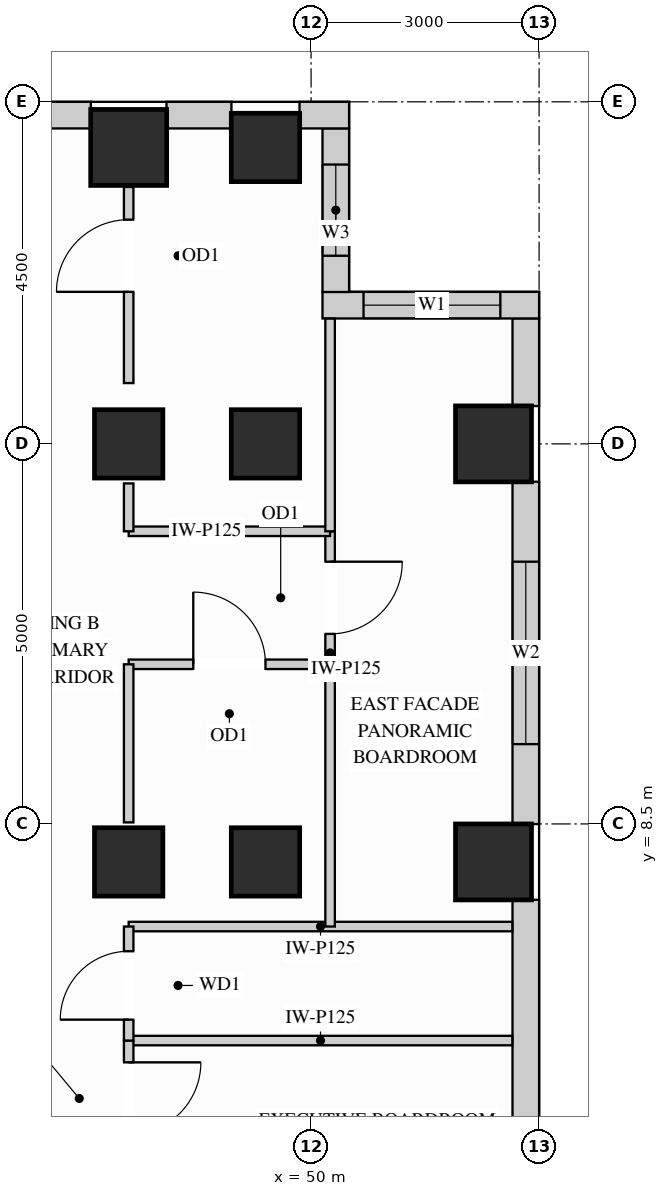
"""IFC4 building model, lengths in metres.
Left out: names, types, materials, properties, quantities, classifications, styles, units other than length and angle.
Written with IfcOpenShell. Run it as: python <this file> out.ifc"""

import sys

from ifc_helpers import new_model, si_unit, direction, frame, frame_2d, origin, origin_2d, place, context, subcontext, project, spatial, rectangle, extrude, source, transform, mapped, element, fill, save


model = new_model("IFC4")
c1 = context("Model", 3, precision=1e-05, world=origin(), true_north=direction((0.0, 1.0)))
c2 = subcontext(c1, "Body", "Model", "MODEL_VIEW")
j1 = project(units=[si_unit("LENGTHUNIT", "METRE"), si_unit("PLANEANGLEUNIT", "RADIAN")], contexts=[c1])
p1 = place(None, origin())
s1 = spatial("IfcSite", under=j1, at=p1, CompositionType="ELEMENT")
p2 = place(p1, origin())
s2 = spatial("IfcBuilding", under=s1, at=p2, CompositionType="ELEMENT")
p3 = place(p2, frame((0.0, 0.0, 204.3)))
s3 = spatial("IfcBuildingStorey", under=s2, at=p3, CompositionType="ELEMENT", Elevation=204.3)
m1 = source(origin(), c2, "Body", "SweptSolid", [
    extrude(rectangle(XDim=0.9, YDim=0.9, at=origin_2d()), origin(), (0.0, 0.0, 1.0), 3.32),
])
for number, where, z_axis, x_axis in (
    (1, (47.6, 13.5, 0.0), (0.0, 0.0, 1.0), (1.0, 0.0, 0.0)),
    (2, (47.6, 8.0, 0.0), (0.0, 0.0, 1.0), (1.0, 0.0, 0.0)),
    (3, (49.4, 13.5, 0.0), (0.0, 0.0, 1.0), (1.0, 0.0, 0.0)),
    (4, (49.4, 17.4, 0.0), (0.0, 0.0, 1.0), (1.0, 0.0, 0.0)),
    (5, (49.4, 8.0, 0.0), (0.0, 0.0, 1.0), (1.0, 0.0, 0.0)),
):
    element("IfcColumn", number, at=place(p3, frame(where, z_axis=z_axis, x_axis=x_axis)), inside=s3, PredefinedType="COLUMN", context=c2, shape_type="MappedRepresentation", body=[
        mapped(m1, transform((0.0, 0.0, 0.0), x_axis=(1.0, 0.0, 0.0), y_axis=(0.0, 1.0, 0.0), z_axis=(0.0, 0.0, 1.0))),
    ])
m2 = source(origin(), c2, "Body", "SweptSolid", [
    extrude(rectangle(XDim=1.0, YDim=1.0, at=origin_2d()), origin(), (0.0, 0.0, 1.0), 3.32),
])
for number, where, z_axis, x_axis in (
    (6, (47.6, 17.4, 0.0), (0.0, 0.0, 1.0), (1.0, 0.0, 0.0)),
    (7, (52.4, 13.5, 0.0), (0.0, 0.0, 1.0), (1.0, 0.0, 0.0)),
    (8, (52.4, 8.0, 0.0), (0.0, 0.0, 1.0), (1.0, 0.0, 0.0)),
):
    element("IfcColumn", number, at=place(p3, frame(where, z_axis=z_axis, x_axis=x_axis)), inside=s3, PredefinedType="COLUMN", context=c2, shape_type="MappedRepresentation", body=[
        mapped(m2, transform((0.0, 0.0, 0.0), x_axis=(1.0, 0.0, 0.0), y_axis=(0.0, 1.0, 0.0), z_axis=(0.0, 0.0, 1.0))),
    ])
m3 = source(origin(), c2, "Body", "SweptSolid", [
    extrude(rectangle(XDim=3.504, YDim=0.35, at=frame_2d((1.752, 0.0))), origin(), (0.0, 0.0, 1.0), 2.532),
])
p4 = place(p3, frame((52.825, 3.998, 0.0), z_axis=(0.0, 0.0, 1.0), x_axis=(0.0, 1.0, 0.0)))
e9 = element("IfcWall", 9, at=p4, inside=s3, PredefinedType="SOLIDWALL", context=c2, shape_type="MappedRepresentation", body=[
    mapped(m3, transform((0.0, 0.0, 0.0), x_axis=(1.0, 0.0, 0.0), y_axis=(0.0, 1.0, 0.0), z_axis=(0.0, 0.0, 1.0))),
])
p5 = place(p3, frame((52.825, 8.498, 0.0), z_axis=(0.0, 0.0, 1.0), x_axis=(0.0, 1.0, 0.0)))
e10 = element("IfcWall", 10, at=p5, inside=s3, PredefinedType="SOLIDWALL", context=c2, shape_type="SweptSolid", body=[
    extrude(rectangle(XDim=4.504, YDim=0.35, at=frame_2d((2.252, 0.0))), origin(), (0.0, 0.0, 1.0), 2.532),
])
p6 = place(p5, frame((1.052, 0.0, 0.78)))
e11 = element("IfcOpeningElement", 11, at=p6, cuts=e10, PredefinedType="OPENING", context=c2, shape_type="SweptSolid", body=[
    extrude(rectangle(XDim=2.4, YDim=1.572, at=frame_2d((1.2, 0.786))), frame((0.0, 0.185, 0.0), z_axis=(0.0, -1.0, 0.0), x_axis=(1.0, 0.0, 0.0)), (0.0, 0.0, 1.0), 0.37),
])
m4 = source(origin(), c2, "Body", "SweptSolid", [
    extrude(rectangle(XDim=1.154, YDim=0.35, at=frame_2d((0.577, 0.0))), origin(), (0.0, 0.0, 1.0), 3.305),
])
p7 = place(p3, frame((52.825, 13.998, 0.0), z_axis=(0.0, 0.0, 1.0), x_axis=(0.0, 1.0, 0.0)))
e12 = element("IfcWall", 12, at=p7, inside=s3, PredefinedType="SOLIDWALL", context=c2, shape_type="MappedRepresentation", body=[
    mapped(m4, transform((0.0, 0.0, 0.0), x_axis=(1.0, 0.0, 0.0), y_axis=(0.0, 1.0, 0.0), z_axis=(0.0, 0.0, 1.0))),
])
p8 = place(p3, frame((53.0, 15.325, 0.0), z_axis=(0.0, 0.0, 1.0), x_axis=(-1.0, 0.0, 0.0)))
e13 = element("IfcWall", 13, at=p8, inside=s3, PredefinedType="SOLIDWALL", context=c2, shape_type="SweptSolid", body=[
    extrude(rectangle(XDim=2.85, YDim=0.35, at=frame_2d((1.425, 0.0))), origin(), (0.0, 0.0, 1.0), 3.305),
])
p9 = place(p8, frame((0.51, 0.0, 0.78)))
e14 = element("IfcOpeningElement", 14, at=p9, cuts=e13, PredefinedType="OPENING", context=c2, shape_type="SweptSolid", body=[
    extrude(rectangle(XDim=1.8, YDim=2.1, at=frame_2d((0.9, 1.05))), frame((0.0, 0.185, 0.0), z_axis=(0.0, -1.0, 0.0), x_axis=(1.0, 0.0, 0.0)), (0.0, 0.0, 1.0), 0.37),
])
p10 = place(p3, frame((50.325, 15.498, 0.0), z_axis=(0.0, 0.0, 1.0), x_axis=(0.0, 1.0, 0.0)))
e15 = element("IfcWall", 15, at=p10, inside=s3, PredefinedType="SOLIDWALL", context=c2, shape_type="SweptSolid", body=[
    extrude(rectangle(XDim=2.154, YDim=0.35, at=frame_2d((1.077, 0.0))), origin(), (0.0, 0.0, 1.0), 3.305),
])
p11 = place(p10, frame((0.477, 0.0, 0.78)))
e16 = element("IfcOpeningElement", 16, at=p11, cuts=e15, PredefinedType="OPENING", context=c2, shape_type="SweptSolid", body=[
    extrude(rectangle(XDim=1.2, YDim=2.1, at=frame_2d((0.6, 1.05))), frame((0.0, 0.185, 0.0), z_axis=(0.0, -1.0, 0.0), x_axis=(1.0, 0.0, 0.0)), (0.0, 0.0, 1.0), 0.37),
])
m5 = source(origin(), c2, "Body", "SweptSolid", [
    extrude(rectangle(XDim=0.652, YDim=0.35, at=frame_2d((0.326, 0.0))), origin(), (0.0, 0.0, 1.0), 3.305),
])
p12 = place(p3, frame((50.5, 17.825, 0.0), z_axis=(0.0, 0.0, 1.0), x_axis=(-1.0, 0.0, 0.0)))
e17 = element("IfcWall", 17, at=p12, inside=s3, PredefinedType="SOLIDWALL", context=c2, shape_type="MappedRepresentation", body=[
    mapped(m5, transform((0.0, 0.0, 0.0), x_axis=(1.0, 0.0, 0.0), y_axis=(0.0, 1.0, 0.0), z_axis=(0.0, 0.0, 1.0))),
])
m6 = source(origin(), c2, "Body", "SweptSolid", [
    extrude(rectangle(XDim=0.854, YDim=0.35, at=frame_2d((0.427, 0.0))), origin(), (0.0, 0.0, 1.0), 3.305),
])
p13 = place(p3, frame((48.952, 17.825, 0.0), z_axis=(0.0, 0.0, 1.0), x_axis=(-1.0, 0.0, 0.0)))
e18 = element("IfcWall", 18, at=p13, inside=s3, PredefinedType="SOLIDWALL", context=c2, shape_type="MappedRepresentation", body=[
    mapped(m6, transform((0.0, 0.0, 0.0), x_axis=(1.0, 0.0, 0.0), y_axis=(0.0, 1.0, 0.0), z_axis=(0.0, 0.0, 1.0))),
])
p14 = place(p3, frame((47.102, 17.825, 0.0), z_axis=(0.0, 0.0, 1.0), x_axis=(-1.0, 0.0, 0.0)))
e19 = element("IfcWall", 19, at=p14, inside=s3, PredefinedType="SOLIDWALL", context=c2, shape_type="SweptSolid", body=[
    extrude(rectangle(XDim=6.604, YDim=0.35, at=frame_2d((3.302, 0.0))), origin(), (0.0, 0.0, 1.0), 2.532),
])
p15 = place(p14, frame((1.849, 0.0, 0.78)))
e20 = element("IfcOpeningElement", 20, at=p15, cuts=e19, PredefinedType="OPENING", context=c2, shape_type="SweptSolid", body=[
    extrude(rectangle(XDim=1.8, YDim=1.572, at=frame_2d((0.9, 0.786))), frame((0.0, 0.185, 0.0), z_axis=(0.0, -1.0, 0.0), x_axis=(1.0, 0.0, 0.0)), (0.0, 0.0, 1.0), 0.37),
])
p16 = place(p14, frame((4.067, 0.0, 0.78)))
e21 = element("IfcOpeningElement", 21, at=p16, cuts=e19, PredefinedType="OPENING", context=c2, shape_type="SweptSolid", body=[
    extrude(rectangle(XDim=1.8, YDim=1.572, at=frame_2d((0.9, 0.786))), frame((0.0, 0.185, 0.0), z_axis=(0.0, -1.0, 0.0), x_axis=(1.0, 0.0, 0.0)), (0.0, 0.0, 1.0), 0.37),
])
p17 = place(p3, frame((50.25, 10.6, 0.0), z_axis=(0.0, 0.0, 1.0), x_axis=(0.0, 1.0, 0.0)))
e22 = element("IfcWall", 22, at=p17, inside=s3, PredefinedType="PARTITIONING", context=c2, shape_type="SweptSolid", body=[
    extrude(rectangle(XDim=1.75, YDim=0.125, at=frame_2d((0.875, 0.0))), origin(), (0.0, 0.0, 1.0), 3.305),
])
p18 = place(p17, frame((0.4, 0.0, 0.0)))
e23 = element("IfcOpeningElement", 23, at=p18, cuts=e22, PredefinedType="OPENING", context=c2, shape_type="SweptSolid", body=[
    extrude(rectangle(XDim=0.95, YDim=2.15, at=frame_2d((0.475, 1.075))), frame((0.0, 0.073, 0.0), z_axis=(0.0, -1.0, 0.0), x_axis=(1.0, 0.0, 0.0)), (0.0, 0.0, 1.0), 0.145),
])
m7 = source(origin(), c2, "Body", "SweptSolid", [
    extrude(rectangle(XDim=5.048, YDim=0.125, at=frame_2d((2.524, 0.0))), origin(), (0.0, 0.0, 1.0), 3.305),
])
for number, where, z_axis, x_axis in (
    (24, (47.6, 5.65, 0.0), (0.0, 0.0, 1.0), (1.0, 0.0, 0.0)),
    (25, (47.6, 7.15, 0.0), (0.0, 0.0, 1.0), (1.0, 0.0, 0.0)),
):
    element("IfcWall", number, at=place(p3, frame(where, z_axis=z_axis, x_axis=x_axis)), inside=s3, PredefinedType="PARTITIONING", context=c2, shape_type="MappedRepresentation", body=[
        mapped(m7, transform((0.0, 0.0, 0.0), x_axis=(1.0, 0.0, 0.0), y_axis=(0.0, 1.0, 0.0), z_axis=(0.0, 0.0, 1.0))),
    ])
m8 = source(origin(), c2, "Body", "SweptSolid", [
    extrude(rectangle(XDim=2.65, YDim=0.125, at=frame_2d((1.325, 0.0))), origin(), (0.0, 0.0, 1.0), 3.305),
])
p19 = place(p3, frame((47.6, 12.35, 0.0), z_axis=(0.0, 0.0, 1.0), x_axis=(1.0, 0.0, 0.0)))
e26 = element("IfcWall", 26, at=p19, inside=s3, PredefinedType="PARTITIONING", context=c2, shape_type="MappedRepresentation", body=[
    mapped(m8, transform((0.0, 0.0, 0.0), x_axis=(1.0, 0.0, 0.0), y_axis=(0.0, 1.0, 0.0), z_axis=(0.0, 0.0, 1.0))),
])
p20 = place(p3, frame((47.6, 10.6, 0.0), z_axis=(0.0, 0.0, 1.0), x_axis=(1.0, 0.0, 0.0)))
e27 = element("IfcWall", 27, at=p20, inside=s3, PredefinedType="PARTITIONING", context=c2, shape_type="SweptSolid", body=[
    extrude(rectangle(XDim=2.65, YDim=0.125, at=frame_2d((1.325, 0.0))), origin(), (0.0, 0.0, 1.0), 2.693),
])
p21 = place(p20, frame((0.85, 0.0, 0.0)))
e28 = element("IfcOpeningElement", 28, at=p21, cuts=e27, PredefinedType="OPENING", context=c2, shape_type="SweptSolid", body=[
    extrude(rectangle(XDim=0.95, YDim=2.15, at=frame_2d((0.475, 1.075))), frame((0.0, 0.073, 0.0), z_axis=(0.0, -1.0, 0.0), x_axis=(1.0, 0.0, 0.0)), (0.0, 0.0, 1.0), 0.145),
])
m9 = source(origin(), c2, "Body", "SweptSolid", [
    extrude(rectangle(XDim=3.45, YDim=0.125, at=frame_2d((1.725, 0.0))), origin(), (0.0, 0.0, 1.0), 3.305),
])
p22 = place(p3, frame((50.25, 7.15, 0.0), z_axis=(0.0, 0.0, 1.0), x_axis=(0.0, 1.0, 0.0)))
e29 = element("IfcWall", 29, at=p22, inside=s3, PredefinedType="PARTITIONING", context=c2, shape_type="MappedRepresentation", body=[
    mapped(m9, transform((0.0, 0.0, 0.0), x_axis=(1.0, 0.0, 0.0), y_axis=(0.0, 1.0, 0.0), z_axis=(0.0, 0.0, 1.0))),
])
m10 = source(origin(), c2, "Body", "SweptSolid", [
    extrude(rectangle(XDim=2.798, YDim=0.125, at=frame_2d((1.399, 0.0))), origin(), (0.0, 0.0, 1.0), 3.305),
])
p23 = place(p3, frame((50.25, 12.35, 0.0), z_axis=(0.0, 0.0, 1.0), x_axis=(0.0, 1.0, 0.0)))
e30 = element("IfcWall", 30, at=p23, inside=s3, PredefinedType="PARTITIONING", context=c2, shape_type="MappedRepresentation", body=[
    mapped(m10, transform((0.0, 0.0, 0.0), x_axis=(1.0, 0.0, 0.0), y_axis=(0.0, 1.0, 0.0), z_axis=(0.0, 0.0, 1.0))),
])
p24 = place(p3, frame((47.6, 4.02, 0.0), z_axis=(0.0, 0.0, 1.0), x_axis=(0.0, 1.0, 0.0)))
e31 = element("IfcWall", 31, at=p24, inside=s3, PredefinedType="PARTITIONING", context=c2, shape_type="SweptSolid", body=[
    extrude(rectangle(XDim=1.63, YDim=0.125, at=frame_2d((0.815, 0.0))), origin(), (0.0, 0.0, 1.0), 2.693),
])
p25 = place(p24, frame((0.393, 0.0, 0.0)))
e32 = element("IfcOpeningElement", 32, at=p25, cuts=e31, PredefinedType="OPENING", context=c2, shape_type="SweptSolid", body=[
    extrude(rectangle(XDim=0.95, YDim=2.15, at=frame_2d((0.475, 1.075))), frame((0.0, 0.073, 0.0), z_axis=(0.0, -1.0, 0.0), x_axis=(1.0, 0.0, 0.0)), (0.0, 0.0, 1.0), 0.145),
])
m11 = source(origin(), c2, "Body", "SweptSolid", [
    extrude(rectangle(XDim=2.08, YDim=0.125, at=frame_2d((1.04, 0.0))), origin(), (0.0, 0.0, 1.0), 2.693),
])
p26 = place(p3, frame((47.6, 8.52, 0.0), z_axis=(0.0, 0.0, 1.0), x_axis=(0.0, 1.0, 0.0)))
e33 = element("IfcWall", 33, at=p26, inside=s3, PredefinedType="PARTITIONING", context=c2, shape_type="MappedRepresentation", body=[
    mapped(m11, transform((0.0, 0.0, 0.0), x_axis=(1.0, 0.0, 0.0), y_axis=(0.0, 1.0, 0.0), z_axis=(0.0, 0.0, 1.0))),
])
p27 = place(p3, frame((47.6, 14.3, 0.0), z_axis=(0.0, 0.0, 1.0), x_axis=(0.0, 1.0, 0.0)))
e34 = element("IfcWall", 34, at=p27, inside=s3, PredefinedType="PARTITIONING", context=c2, shape_type="SweptSolid", body=[
    extrude(rectangle(XDim=2.58, YDim=0.125, at=frame_2d((1.29, 0.0))), origin(), (0.0, 0.0, 1.0), 2.693),
])
p28 = place(p27, frame((1.2, 0.0, 0.0)))
e35 = element("IfcOpeningElement", 35, at=p28, cuts=e34, PredefinedType="OPENING", context=c2, shape_type="SweptSolid", body=[
    extrude(rectangle(XDim=0.95, YDim=2.15, at=frame_2d((0.475, 1.075))), frame((0.0, 0.073, 0.0), z_axis=(0.0, -1.0, 0.0), x_axis=(1.0, 0.0, 0.0)), (0.0, 0.0, 1.0), 0.145),
])
m12 = source(origin(), c2, "Body", "SweptSolid", [
    extrude(rectangle(XDim=0.63, YDim=0.125, at=frame_2d((0.315, 0.0))), origin(), (0.0, 0.0, 1.0), 2.693),
])
p29 = place(p3, frame((47.6, 12.35, 0.0), z_axis=(0.0, 0.0, 1.0), x_axis=(0.0, 1.0, 0.0)))
e36 = element("IfcWall", 36, at=p29, inside=s3, PredefinedType="PARTITIONING", context=c2, shape_type="MappedRepresentation", body=[
    mapped(m12, transform((0.0, 0.0, 0.0), x_axis=(1.0, 0.0, 0.0), y_axis=(0.0, 1.0, 0.0), z_axis=(0.0, 0.0, 1.0))),
])
p30 = place(p3, frame((47.6, 5.65, 0.0), z_axis=(0.0, 0.0, 1.0), x_axis=(0.0, 1.0, 0.0)))
e37 = element("IfcWall", 37, at=p30, inside=s3, PredefinedType="PARTITIONING", context=c2, shape_type="SweptSolid", body=[
    extrude(rectangle(XDim=1.5, YDim=0.125, at=frame_2d((0.75, 0.0))), origin(), (0.0, 0.0, 1.0), 2.693),
])
p31 = place(p30, frame((0.275, 0.0, 0.0)))
e38 = element("IfcOpeningElement", 38, at=p31, cuts=e37, PredefinedType="OPENING", context=c2, shape_type="SweptSolid", body=[
    extrude(rectangle(XDim=0.9, YDim=2.15, at=frame_2d((0.45, 1.075))), frame((0.0, 0.073, 0.0), z_axis=(0.0, -1.0, 0.0), x_axis=(1.0, 0.0, 0.0)), (0.0, 0.0, 1.0), 0.145),
])
m13 = source(origin(), c2, "Body", "SweptSolid", [
    extrude(rectangle(XDim=0.95, YDim=2.15, at=frame_2d((0.475, 1.075))), frame((0.0, 0.025, 0.0), z_axis=(0.0, -1.0, 0.0), x_axis=(1.0, 0.0, 0.0)), (0.0, 0.0, 1.0), 0.05),
])
p32 = place(p25, origin())
e39 = element("IfcDoor", 39, at=p32, inside=s3, OperationType="SINGLE_SWING_RIGHT", PredefinedType="DOOR", context=c2, shape_type="MappedRepresentation", body=[
    mapped(m13, transform((0.0, 0.0, 0.0), x_axis=(1.0, 0.0, 0.0), y_axis=(0.0, 1.0, 0.0), z_axis=(0.0, 0.0, 1.0))),
])
fill(e32, e39)
p33 = place(p21, origin())
e40 = element("IfcDoor", 40, at=p33, inside=s3, OperationType="SINGLE_SWING_LEFT", PredefinedType="DOOR", context=c2, shape_type="MappedRepresentation", body=[
    mapped(m13, transform((0.0, 0.0, 0.0), x_axis=(1.0, 0.0, 0.0), y_axis=(0.0, 1.0, 0.0), z_axis=(0.0, 0.0, 1.0))),
])
fill(e28, e40)
p34 = place(p18, origin())
e41 = element("IfcDoor", 41, at=p34, inside=s3, OperationType="SINGLE_SWING_RIGHT", PredefinedType="DOOR", context=c2, shape_type="MappedRepresentation", body=[
    mapped(m13, transform((0.0, 0.0, 0.0), x_axis=(1.0, 0.0, 0.0), y_axis=(0.0, 1.0, 0.0), z_axis=(0.0, 0.0, 1.0))),
])
fill(e23, e41)
p35 = place(p28, origin())
e42 = element("IfcDoor", 42, at=p35, inside=s3, OperationType="SINGLE_SWING_LEFT", PredefinedType="DOOR", context=c2, shape_type="MappedRepresentation", body=[
    mapped(m13, transform((0.0, 0.0, 0.0), x_axis=(1.0, 0.0, 0.0), y_axis=(0.0, 1.0, 0.0), z_axis=(0.0, 0.0, 1.0))),
])
fill(e35, e42)
m14 = source(origin(), c2, "Body", "SweptSolid", [
    extrude(rectangle(XDim=0.9, YDim=2.15, at=frame_2d((0.45, 1.075))), frame((0.0, 0.025, 0.0), z_axis=(0.0, -1.0, 0.0), x_axis=(1.0, 0.0, 0.0)), (0.0, 0.0, 1.0), 0.05),
])
p36 = place(p31, origin())
e43 = element("IfcDoor", 43, at=p36, inside=s3, OperationType="SINGLE_SWING_LEFT", PredefinedType="DOOR", context=c2, shape_type="MappedRepresentation", body=[
    mapped(m14, transform((0.0, 0.0, 0.0), x_axis=(1.0, 0.0, 0.0), y_axis=(0.0, 1.0, 0.0), z_axis=(0.0, 0.0, 1.0))),
])
fill(e38, e43)
m15 = source(origin(), c2, "Body", "SweptSolid", [
    extrude(rectangle(XDim=1.8, YDim=2.1, at=frame_2d((0.9, 1.05))), frame((0.0, 0.03, 0.0), z_axis=(0.0, -1.0, 0.0), x_axis=(1.0, 0.0, 0.0)), (0.0, 0.0, 1.0), 0.06),
])
p37 = place(p9, origin())
e44 = element("IfcWindow", 44, at=p37, inside=s3, PartitioningType="SINGLE_PANEL", PredefinedType="WINDOW", context=c2, shape_type="MappedRepresentation", body=[
    mapped(m15, transform((0.0, 0.0, 0.0), x_axis=(1.0, 0.0, 0.0), y_axis=(0.0, 1.0, 0.0), z_axis=(0.0, 0.0, 1.0))),
])
fill(e14, e44)
m16 = source(origin(), c2, "Body", "SweptSolid", [
    extrude(rectangle(XDim=2.4, YDim=1.572, at=frame_2d((1.2, 0.786))), frame((0.0, 0.03, 0.0), z_axis=(0.0, -1.0, 0.0), x_axis=(1.0, 0.0, 0.0)), (0.0, 0.0, 1.0), 0.06),
])
p38 = place(p6, origin())
e45 = element("IfcWindow", 45, at=p38, inside=s3, PartitioningType="SINGLE_PANEL", PredefinedType="WINDOW", context=c2, shape_type="MappedRepresentation", body=[
    mapped(m16, transform((0.0, 0.0, 0.0), x_axis=(1.0, 0.0, 0.0), y_axis=(0.0, 1.0, 0.0), z_axis=(0.0, 0.0, 1.0))),
])
fill(e11, e45)
m17 = source(origin(), c2, "Body", "SweptSolid", [
    extrude(rectangle(XDim=1.2, YDim=2.1, at=frame_2d((0.6, 1.05))), frame((0.0, 0.03, 0.0), z_axis=(0.0, -1.0, 0.0), x_axis=(1.0, 0.0, 0.0)), (0.0, 0.0, 1.0), 0.06),
])
p39 = place(p11, origin())
e46 = element("IfcWindow", 46, at=p39, inside=s3, PartitioningType="SINGLE_PANEL", PredefinedType="WINDOW", context=c2, shape_type="MappedRepresentation", body=[
    mapped(m17, transform((0.0, 0.0, 0.0), x_axis=(1.0, 0.0, 0.0), y_axis=(0.0, 1.0, 0.0), z_axis=(0.0, 0.0, 1.0))),
])
fill(e16, e46)
save(model, sys.argv[1])
